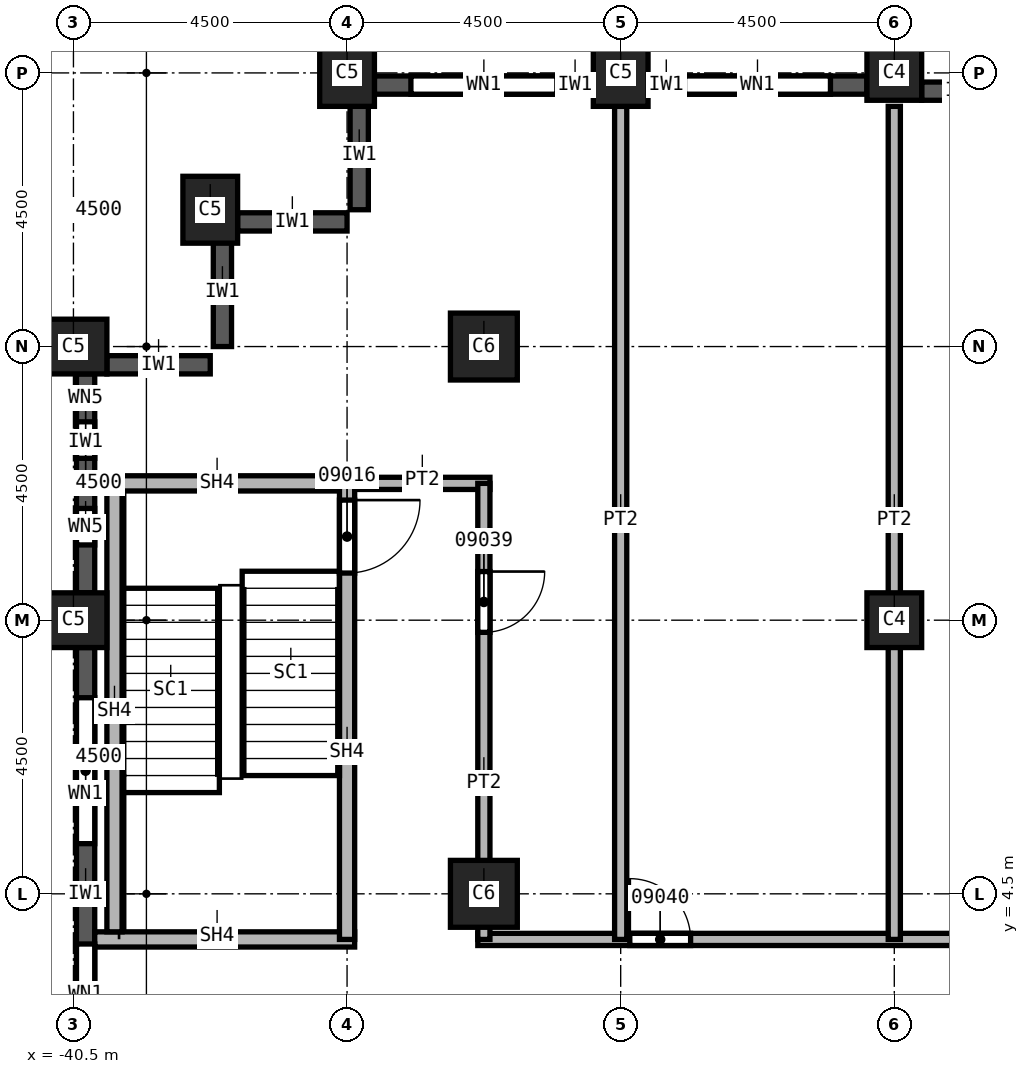
"""IFC4 building model, lengths in metres.
Left out: names, types, materials, properties, quantities, classifications, styles, units other than length and angle.
Written with IfcOpenShell. Run it as: python <this file> out.ifc"""

import sys

from ifc_helpers import new_model, si_unit, direction, frame, frame_2d, origin, origin_2d, place, context, subcontext, project, spatial, rectangle, extrude, element, fill, save


model = new_model("IFC4")
c1 = context("Model", 3, precision=1e-05, world=origin(), true_north=direction((0.0, 1.0)))
c2 = subcontext(c1, "Body", "Model", "MODEL_VIEW")
j1 = project(units=[si_unit("LENGTHUNIT", "METRE"), si_unit("PLANEANGLEUNIT", "RADIAN")], contexts=[c1])
p1 = place(None, origin())
s1 = spatial("IfcSite", under=j1, at=p1, CompositionType="ELEMENT")
p2 = place(p1, origin())
s2 = spatial("IfcBuilding", under=s1, at=p2, CompositionType="ELEMENT")
p3 = place(p2, frame((0.0, 0.0, 166.0)))
s3 = spatial("IfcBuildingStorey", under=s2, at=p3, CompositionType="ELEMENT", Elevation=166.0)
for number, where, z_axis, x_axis in (
    (1, (-40.5, 9.0, 0.0), (0.0, 0.0, 1.0), (0.0, 1.0, 0.0)),
    (2, (-40.5, 13.5, 0.0), (0.0, 0.0, 1.0), (0.0, 1.0, 0.0)),
    (3, (-38.25, 15.75, 0.0), (0.0, 0.0, 1.0), (1.0, 0.0, 0.0)),
    (4, (-31.5, 18.0, 0.0), (0.0, 0.0, 1.0), (1.0, 0.0, 0.0)),
    (5, (-36.0, 18.0, 0.0), (0.0, 0.0, 1.0), (1.0, 0.0, 0.0)),
):
    element("IfcColumn", number, at=place(p3, frame(where, z_axis=z_axis, x_axis=x_axis)), inside=s3, PredefinedType="COLUMN", context=c2, shape_type="SweptSolid", body=[
        extrude(rectangle(XDim=0.9, YDim=1.1, at=origin_2d()), origin(), (0.0, 0.0, 1.0), 3.7),
    ])
for number, where, z_axis, x_axis in (
    (6, (-33.75, 4.5, 0.0), (0.0, 0.0, 1.0), (1.0, 0.0, 0.0)),
    (7, (-33.75, 13.5, 0.0), (0.0, 0.0, 1.0), (1.0, 0.0, 0.0)),
):
    element("IfcColumn", number, at=place(p3, frame(where, z_axis=z_axis, x_axis=x_axis)), inside=s3, PredefinedType="COLUMN", context=c2, shape_type="SweptSolid", body=[
        extrude(rectangle(XDim=1.1, YDim=1.1, at=origin_2d()), origin(), (0.0, 0.0, 1.0), 3.7),
    ])
for number, where, z_axis, x_axis in (
    (8, (-27.0, 9.0, 0.0), (0.0, 0.0, 1.0), (1.0, 0.0, 0.0)),
    (9, (-27.0, 18.0, 0.0), (0.0, 0.0, 1.0), (1.0, 0.0, 0.0)),
):
    element("IfcColumn", number, at=place(p3, frame(where, z_axis=z_axis, x_axis=x_axis)), inside=s3, PredefinedType="COLUMN", context=c2, shape_type="SweptSolid", body=[
        extrude(rectangle(XDim=0.9, YDim=0.9, at=origin_2d()), origin(), (0.0, 0.0, 1.0), 3.7),
    ])
for number, where, z_axis, x_axis in (
    (10, (-35.8, 17.55, 0.0), (0.0, 0.0, 1.0), (0.0, -1.0, 0.0)),
    (11, (-37.8, 15.55, 0.0), (0.0, 0.0, 1.0), (1.0, 0.0, 0.0)),
    (12, (-38.05, 15.3, 0.0), (0.0, 0.0, 1.0), (0.0, -1.0, 0.0)),
):
    element("IfcWall", number, at=place(p3, frame(where, z_axis=z_axis, x_axis=x_axis)), inside=s3, PredefinedType="SOLIDWALL", context=c2, shape_type="SweptSolid", body=[
        extrude(rectangle(XDim=1.8, YDim=0.3, at=frame_2d((0.9, 0.0))), origin(), (0.0, 0.0, 1.0), 3.1),
    ])
p4 = place(p3, frame((-39.95, 13.2, 0.0), z_axis=(0.0, 0.0, 1.0), x_axis=(1.0, 0.0, 0.0)))
e13 = element("IfcWall", 13, at=p4, inside=s3, PredefinedType="SOLIDWALL", context=c2, shape_type="SweptSolid", body=[
    extrude(rectangle(XDim=1.7, YDim=0.3, at=frame_2d((0.85, 0.0))), origin(), (0.0, 0.0, 1.0), 3.1),
])
p5 = place(p3, frame((-25.2, 17.7, 0.0), z_axis=(0.0, 0.0, 1.0), x_axis=(-1.0, 0.0, 0.0)))
e14 = element("IfcWall", 14, at=p5, inside=s3, PredefinedType="SOLIDWALL", context=c2, shape_type="SweptSolid", body=[
    extrude(rectangle(XDim=1.35, YDim=0.3, at=frame_2d((0.675, 0.0))), origin(), (0.0, 0.0, 1.0), 3.1),
])
p6 = place(p3, frame((-27.45, 17.8, 0.0), z_axis=(0.0, 0.0, 1.0), x_axis=(-1.0, 0.0, 0.0)))
e15 = element("IfcWall", 15, at=p6, inside=s3, PredefinedType="SOLIDWALL", context=c2, shape_type="SweptSolid", body=[
    extrude(rectangle(XDim=3.6, YDim=0.3, at=frame_2d((1.8, 0.0))), origin(), (0.0, 0.0, 1.0), 3.1),
])
p7 = place(p6, frame((0.6, 0.0, 0.8)))
e16 = element("IfcOpeningElement", 16, at=p7, cuts=e15, PredefinedType="OPENING", context=c2, shape_type="SweptSolid", body=[
    extrude(rectangle(XDim=2.4, YDim=1.95, at=frame_2d((1.2, 0.975))), frame((0.0, 0.15, 0.0), z_axis=(0.0, -1.0, 0.0), x_axis=(1.0, 0.0, 0.0)), (0.0, 0.0, 1.0), 0.3),
])
p8 = place(p3, frame((-31.95, 17.8, 0.0), z_axis=(0.0, 0.0, 1.0), x_axis=(-1.0, 0.0, 0.0)))
e17 = element("IfcWall", 17, at=p8, inside=s3, PredefinedType="SOLIDWALL", context=c2, shape_type="SweptSolid", body=[
    extrude(rectangle(XDim=3.6, YDim=0.3, at=frame_2d((1.8, 0.0))), origin(), (0.0, 0.0, 1.0), 3.1),
])
p9 = place(p8, frame((0.6, 0.0, 0.8)))
e18 = element("IfcOpeningElement", 18, at=p9, cuts=e17, PredefinedType="OPENING", context=c2, shape_type="SweptSolid", body=[
    extrude(rectangle(XDim=2.4, YDim=1.95, at=frame_2d((1.2, 0.975))), frame((0.0, 0.15, 0.0), z_axis=(0.0, -1.0, 0.0), x_axis=(1.0, 0.0, 0.0)), (0.0, 0.0, 1.0), 0.3),
])
p10 = place(p3, frame((-40.3, 13.05, 0.0), z_axis=(0.0, 0.0, 1.0), x_axis=(0.0, -1.0, 0.0)))
e19 = element("IfcWall", 19, at=p10, inside=s3, PredefinedType="SOLIDWALL", context=c2, shape_type="SweptSolid", body=[
    extrude(rectangle(XDim=3.6, YDim=0.3, at=frame_2d((1.8, 0.0))), origin(), (0.0, 0.0, 1.0), 3.1),
])
p11 = place(p10, frame((0.788, 0.0, 0.8)))
e20 = element("IfcOpeningElement", 20, at=p11, cuts=e19, PredefinedType="OPENING", context=c2, shape_type="SweptSolid", body=[
    extrude(rectangle(XDim=0.6, YDim=1.95, at=frame_2d((0.3, 0.975))), frame((0.0, 0.15, 0.0), z_axis=(0.0, -1.0, 0.0), x_axis=(1.0, 0.0, 0.0)), (0.0, 0.0, 1.0), 0.3),
])
p12 = place(p10, frame((2.212, 0.0, 0.8)))
e21 = element("IfcOpeningElement", 21, at=p12, cuts=e19, PredefinedType="OPENING", context=c2, shape_type="SweptSolid", body=[
    extrude(rectangle(XDim=0.6, YDim=1.95, at=frame_2d((0.3, 0.975))), frame((0.0, 0.15, 0.0), z_axis=(0.0, -1.0, 0.0), x_axis=(1.0, 0.0, 0.0)), (0.0, 0.0, 1.0), 0.3),
])
p13 = place(p3, frame((-40.3, 8.55, 0.0), z_axis=(0.0, 0.0, 1.0), x_axis=(0.0, -1.0, 0.0)))
e22 = element("IfcWall", 22, at=p13, inside=s3, PredefinedType="SOLIDWALL", context=c2, shape_type="SweptSolid", body=[
    extrude(rectangle(XDim=8.1, YDim=0.3, at=frame_2d((4.05, 0.0))), origin(), (0.0, 0.0, 1.0), 3.1),
])
p14 = place(p13, frame((0.825, 0.0, 0.8)))
e23 = element("IfcOpeningElement", 23, at=p14, cuts=e22, PredefinedType="OPENING", context=c2, shape_type="SweptSolid", body=[
    extrude(rectangle(XDim=2.4, YDim=1.95, at=frame_2d((1.2, 0.975))), frame((0.0, 0.15, 0.0), z_axis=(0.0, -1.0, 0.0), x_axis=(1.0, 0.0, 0.0)), (0.0, 0.0, 1.0), 0.3),
])
p15 = place(p13, frame((4.875, 0.0, 0.8)))
e24 = element("IfcOpeningElement", 24, at=p15, cuts=e22, PredefinedType="OPENING", context=c2, shape_type="SweptSolid", body=[
    extrude(rectangle(XDim=2.4, YDim=1.95, at=frame_2d((1.2, 0.975))), frame((0.0, 0.15, 0.0), z_axis=(0.0, -1.0, 0.0), x_axis=(1.0, 0.0, 0.0)), (0.0, 0.0, 1.0), 0.3),
])
p16 = place(p3, frame((-36.0, 11.25, 0.0), z_axis=(0.0, 0.0, 1.0), x_axis=(1.0, 0.0, 0.0)))
e25 = element("IfcWall", 25, at=p16, inside=s3, PredefinedType="PARTITIONING", context=c2, shape_type="SweptSolid", body=[
    extrude(rectangle(XDim=2.35, YDim=0.2, at=frame_2d((1.175, 0.0))), origin(), (0.0, 0.0, 1.0), 3.7),
])
p17 = place(p3, frame((-33.85, 3.75, 0.0), z_axis=(0.0, 0.0, 1.0), x_axis=(1.0, 0.0, 0.0)))
e26 = element("IfcWall", 26, at=p17, inside=s3, PredefinedType="PARTITIONING", context=c2, shape_type="SweptSolid", body=[
    extrude(rectangle(XDim=18.45, YDim=0.2, at=frame_2d((9.225, 0.0))), origin(), (0.0, 0.0, 1.0), 3.7),
])
p18 = place(p17, frame((2.5, 0.0, 0.0)))
e27 = element("IfcOpeningElement", 27, at=p18, cuts=e26, PredefinedType="OPENING", context=c2, shape_type="SweptSolid", body=[
    extrude(rectangle(XDim=1.0, YDim=2.1, at=frame_2d((0.5, 1.05))), frame((0.0, 0.1, 0.0), z_axis=(0.0, -1.0, 0.0), x_axis=(1.0, 0.0, 0.0)), (0.0, 0.0, 1.0), 0.2),
])
p19 = place(p3, frame((-33.75, 11.25, 0.0), z_axis=(0.0, 0.0, 1.0), x_axis=(0.0, -1.0, 0.0)))
e28 = element("IfcWall", 28, at=p19, inside=s3, PredefinedType="PARTITIONING", context=c2, shape_type="SweptSolid", body=[
    extrude(rectangle(XDim=7.5, YDim=0.2, at=frame_2d((3.75, 0.0))), origin(), (0.0, 0.0, 1.0), 3.7),
])
p20 = place(p19, frame((1.45, 0.0, 0.0)))
e29 = element("IfcOpeningElement", 29, at=p20, cuts=e28, PredefinedType="OPENING", context=c2, shape_type="SweptSolid", body=[
    extrude(rectangle(XDim=1.0, YDim=2.1, at=frame_2d((0.5, 1.05))), frame((0.0, 0.1, 0.0), z_axis=(0.0, -1.0, 0.0), x_axis=(1.0, 0.0, 0.0)), (0.0, 0.0, 1.0), 0.2),
])
for number, where, z_axis, x_axis in (
    (30, (-31.5, 17.45, 0.0), (0.0, 0.0, 1.0), (0.0, -1.0, 0.0)),
    (31, (-27.0, 3.75, 0.0), (0.0, 0.0, 1.0), (0.0, 1.0, 0.0)),
):
    element("IfcWall", number, at=place(p3, frame(where, z_axis=z_axis, x_axis=x_axis)), inside=s3, PredefinedType="PARTITIONING", context=c2, shape_type="SweptSolid", body=[
        extrude(rectangle(XDim=13.7, YDim=0.2, at=frame_2d((6.85, 0.0))), origin(), (0.0, 0.0, 1.0), 3.7),
    ])
p21 = place(p3, frame((-40.15, 3.75, 0.0), z_axis=(0.0, 0.0, 1.0), x_axis=(1.0, 0.0, 0.0)))
e32 = element("IfcWall", 32, at=p21, inside=s3, PredefinedType="SOLIDWALL", context=c2, shape_type="SweptSolid", body=[
    extrude(rectangle(XDim=4.275, YDim=0.25, at=frame_2d((2.137, 0.0))), origin(), (0.0, 0.0, 1.0), 3.7),
])
p22 = place(p3, frame((-40.15, 11.25, 0.0), z_axis=(0.0, 0.0, 1.0), x_axis=(1.0, 0.0, 0.0)))
e33 = element("IfcWall", 33, at=p22, inside=s3, PredefinedType="SOLIDWALL", context=c2, shape_type="SweptSolid", body=[
    extrude(rectangle(XDim=4.15, YDim=0.25, at=frame_2d((2.075, 0.0))), origin(), (0.0, 0.0, 1.0), 3.7),
])
p23 = place(p3, frame((-36.0, 11.375, 0.0), z_axis=(0.0, 0.0, 1.0), x_axis=(0.0, -1.0, 0.0)))
e34 = element("IfcWall", 34, at=p23, inside=s3, PredefinedType="SOLIDWALL", context=c2, shape_type="SweptSolid", body=[
    extrude(rectangle(XDim=7.625, YDim=0.25, at=frame_2d((3.812, 0.0))), origin(), (0.0, 0.0, 1.0), 3.7),
])
p24 = place(p23, frame((0.4, 0.0, 0.0)))
e35 = element("IfcOpeningElement", 35, at=p24, cuts=e34, PredefinedType="OPENING", context=c2, shape_type="SweptSolid", body=[
    extrude(rectangle(XDim=1.2, YDim=2.1, at=frame_2d((0.6, 1.05))), frame((0.0, 0.125, 0.0), z_axis=(0.0, -1.0, 0.0), x_axis=(1.0, 0.0, 0.0)), (0.0, 0.0, 1.0), 0.25),
])
p25 = place(p3, frame((-39.825, 3.875, 0.0), z_axis=(0.0, 0.0, 1.0), x_axis=(0.0, 1.0, 0.0)))
e36 = element("IfcWall", 36, at=p25, inside=s3, PredefinedType="SOLIDWALL", context=c2, shape_type="SweptSolid", body=[
    extrude(rectangle(XDim=7.25, YDim=0.25, at=frame_2d((3.625, 0.0))), origin(), (0.0, 0.0, 1.0), 3.7),
])
p26 = place(p7, origin())
e37 = element("IfcWindow", 37, at=p26, inside=s3, PartitioningType="SINGLE_PANEL", PredefinedType="WINDOW", context=c2, shape_type="SweptSolid", body=[
    extrude(rectangle(XDim=2.4, YDim=1.95, at=frame_2d((1.2, 0.975))), frame((0.0, 0.03, 0.0), z_axis=(0.0, -1.0, 0.0), x_axis=(1.0, 0.0, 0.0)), (0.0, 0.0, 1.0), 0.06),
])
fill(e16, e37)
p27 = place(p9, origin())
e38 = element("IfcWindow", 38, at=p27, inside=s3, PartitioningType="SINGLE_PANEL", PredefinedType="WINDOW", context=c2, shape_type="SweptSolid", body=[
    extrude(rectangle(XDim=2.4, YDim=1.95, at=frame_2d((1.2, 0.975))), frame((0.0, 0.03, 0.0), z_axis=(0.0, -1.0, 0.0), x_axis=(1.0, 0.0, 0.0)), (0.0, 0.0, 1.0), 0.06),
])
fill(e18, e38)
p28 = place(p14, origin())
e39 = element("IfcWindow", 39, at=p28, inside=s3, PartitioningType="SINGLE_PANEL", PredefinedType="WINDOW", context=c2, shape_type="SweptSolid", body=[
    extrude(rectangle(XDim=2.4, YDim=1.95, at=frame_2d((1.2, 0.975))), frame((0.0, 0.03, 0.0), z_axis=(0.0, -1.0, 0.0), x_axis=(1.0, 0.0, 0.0)), (0.0, 0.0, 1.0), 0.06),
])
fill(e23, e39)
p29 = place(p15, origin())
e40 = element("IfcWindow", 40, at=p29, inside=s3, PartitioningType="SINGLE_PANEL", PredefinedType="WINDOW", context=c2, shape_type="SweptSolid", body=[
    extrude(rectangle(XDim=2.4, YDim=1.95, at=frame_2d((1.2, 0.975))), frame((0.0, 0.03, 0.0), z_axis=(0.0, -1.0, 0.0), x_axis=(1.0, 0.0, 0.0)), (0.0, 0.0, 1.0), 0.06),
])
fill(e24, e40)
p30 = place(p24, origin())
e41 = element("IfcDoor", 41, at=p30, inside=s3, OperationType="SINGLE_SWING_LEFT", PredefinedType="DOOR", context=c2, shape_type="SweptSolid", body=[
    extrude(rectangle(XDim=1.2, YDim=2.1, at=frame_2d((0.6, 1.05))), frame((0.0, 0.025, 0.0), z_axis=(0.0, -1.0, 0.0), x_axis=(1.0, 0.0, 0.0)), (0.0, 0.0, 1.0), 0.05),
])
fill(e35, e41)
p31 = place(p20, origin())
e42 = element("IfcDoor", 42, at=p31, inside=s3, OperationType="SINGLE_SWING_RIGHT", PredefinedType="DOOR", context=c2, shape_type="SweptSolid", body=[
    extrude(rectangle(XDim=1.0, YDim=2.1, at=frame_2d((0.5, 1.05))), frame((0.0, 0.025, 0.0), z_axis=(0.0, -1.0, 0.0), x_axis=(1.0, 0.0, 0.0)), (0.0, 0.0, 1.0), 0.05),
])
fill(e29, e42)
p32 = place(p18, origin())
e43 = element("IfcDoor", 43, at=p32, inside=s3, OperationType="SINGLE_SWING_LEFT", PredefinedType="DOOR", context=c2, shape_type="SweptSolid", body=[
    extrude(rectangle(XDim=1.0, YDim=2.1, at=frame_2d((0.5, 1.05))), frame((0.0, 0.025, 0.0), z_axis=(0.0, -1.0, 0.0), x_axis=(1.0, 0.0, 0.0)), (0.0, 0.0, 1.0), 0.05),
])
fill(e27, e43)
p33 = place(p11, origin())
e44 = element("IfcWindow", 44, at=p33, inside=s3, PartitioningType="SINGLE_PANEL", PredefinedType="WINDOW", context=c2, shape_type="SweptSolid", body=[
    extrude(rectangle(XDim=0.6, YDim=1.95, at=frame_2d((0.3, 0.975))), frame((0.0, 0.03, 0.0), z_axis=(0.0, -1.0, 0.0), x_axis=(1.0, 0.0, 0.0)), (0.0, 0.0, 1.0), 0.06),
])
fill(e20, e44)
p34 = place(p12, origin())
e45 = element("IfcWindow", 45, at=p34, inside=s3, PartitioningType="SINGLE_PANEL", PredefinedType="WINDOW", context=c2, shape_type="SweptSolid", body=[
    extrude(rectangle(XDim=0.6, YDim=1.95, at=frame_2d((0.3, 0.975))), frame((0.0, 0.03, 0.0), z_axis=(0.0, -1.0, 0.0), x_axis=(1.0, 0.0, 0.0)), (0.0, 0.0, 1.0), 0.06),
])
fill(e21, e45)
save(model, sys.argv[1])
